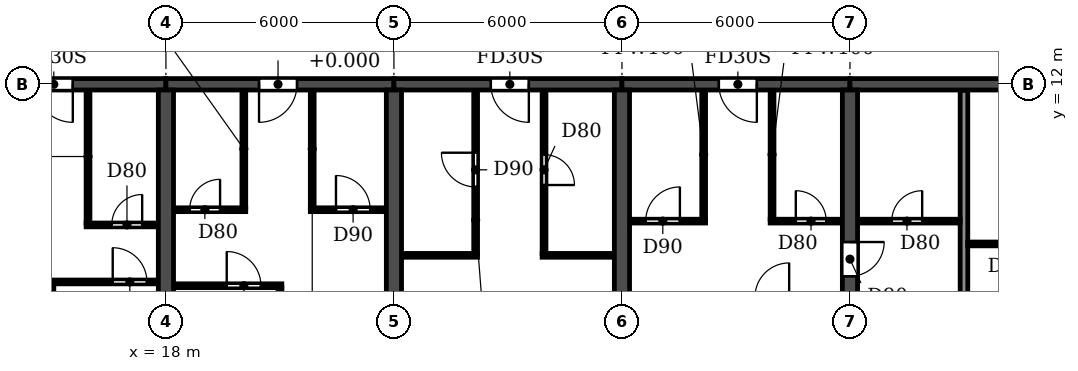
"""IFC4 building model, lengths in metres.
Left out: names, types, materials, properties, quantities, classifications, styles, units other than length and angle.
Written with IfcOpenShell. Run it as: python <this file> out.ifc"""

import sys

from ifc_helpers import new_model, si_unit, direction, frame, frame_2d, origin, place, context, subcontext, project, spatial, rectangle, extrude, element, fill, save


model = new_model("IFC4")
c1 = context("Model", 3, precision=1e-05, world=origin(), true_north=direction((0.0, 1.0)))
c2 = subcontext(c1, "Body", "Model", "MODEL_VIEW")
j1 = project(units=[si_unit("LENGTHUNIT", "METRE"), si_unit("PLANEANGLEUNIT", "RADIAN")], contexts=[c1])
p1 = place(None, origin())
s1 = spatial("IfcSite", under=j1, at=p1, CompositionType="ELEMENT")
p2 = place(p1, origin())
s2 = spatial("IfcBuilding", under=s1, at=p2, CompositionType="ELEMENT")
p3 = place(p2, frame((0.0, 0.0, 33.3)))
s3 = spatial("IfcBuildingStorey", under=s2, at=p3, CompositionType="ELEMENT", Elevation=33.3)
for number, where, z_axis, x_axis in (
    (1, (18.0, 0.2, 0.0), (0.0, 0.0, 1.0), (0.0, 1.0, 0.0)),
    (2, (24.0, 0.2, 0.0), (0.0, 0.0, 1.0), (0.0, 1.0, 0.0)),
    (3, (30.0, 0.2, 0.0), (0.0, 0.0, 1.0), (0.0, 1.0, 0.0)),
):
    element("IfcWall", number, at=place(p3, frame(where, z_axis=z_axis, x_axis=x_axis)), inside=s3, PredefinedType="SHEAR", context=c2, shape_type="SweptSolid", body=[
        extrude(rectangle(XDim=11.65, YDim=0.4, at=frame_2d((5.825, 0.0))), origin(), (0.0, 0.0, 1.0), 3.05),
    ])
p4 = place(p3, frame((36.0, 0.2, 0.0), z_axis=(0.0, 0.0, 1.0), x_axis=(0.0, 1.0, 0.0)))
e4 = element("IfcWall", 4, at=p4, inside=s3, PredefinedType="SHEAR", context=c2, shape_type="SweptSolid", body=[
    extrude(rectangle(XDim=11.65, YDim=0.4, at=frame_2d((5.825, 0.0))), origin(), (0.0, 0.0, 1.0), 3.05),
])
p5 = place(p4, frame((6.75, 0.0, 0.0)))
e5 = element("IfcOpeningElement", 5, at=p5, cuts=e4, PredefinedType="OPENING", context=c2, shape_type="SweptSolid", body=[
    extrude(rectangle(XDim=0.9, YDim=2.1, at=frame_2d((0.45, 1.05))), frame((0.0, 0.21, 0.0), z_axis=(0.0, -1.0, 0.0), x_axis=(1.0, 0.0, 0.0)), (0.0, 0.0, 1.0), 0.42),
])
p6 = place(p3, frame((12.0, 12.0, 0.0), z_axis=(0.0, 0.0, 1.0), x_axis=(1.0, 0.0, 0.0)))
e6 = element("IfcWall", 6, at=p6, inside=s3, PredefinedType="SHEAR", context=c2, shape_type="SweptSolid", body=[
    extrude(rectangle(XDim=6.0, YDim=0.3, at=frame_2d((3.0, 0.0))), origin(), (0.0, 0.0, 1.0), 2.45),
])
p7 = place(p6, frame((2.55, 0.0, 0.0)))
e7 = element("IfcOpeningElement", 7, at=p7, cuts=e6, PredefinedType="OPENING", context=c2, shape_type="SweptSolid", body=[
    extrude(rectangle(XDim=1.0, YDim=2.1, at=frame_2d((0.5, 1.05))), frame((0.0, 0.16, 0.0), z_axis=(0.0, -1.0, 0.0), x_axis=(1.0, 0.0, 0.0)), (0.0, 0.0, 1.0), 0.32),
])
p8 = place(p3, frame((18.0, 12.0, 0.0), z_axis=(0.0, 0.0, 1.0), x_axis=(1.0, 0.0, 0.0)))
e8 = element("IfcWall", 8, at=p8, inside=s3, PredefinedType="SHEAR", context=c2, shape_type="SweptSolid", body=[
    extrude(rectangle(XDim=6.0, YDim=0.3, at=frame_2d((3.0, 0.0))), origin(), (0.0, 0.0, 1.0), 2.45),
])
p9 = place(p8, frame((2.45, 0.0, 0.0)))
e9 = element("IfcOpeningElement", 9, at=p9, cuts=e8, PredefinedType="OPENING", context=c2, shape_type="SweptSolid", body=[
    extrude(rectangle(XDim=1.0, YDim=2.1, at=frame_2d((0.5, 1.05))), frame((0.0, 0.16, 0.0), z_axis=(0.0, -1.0, 0.0), x_axis=(1.0, 0.0, 0.0)), (0.0, 0.0, 1.0), 0.32),
])
p10 = place(p3, frame((24.0, 12.0, 0.0), z_axis=(0.0, 0.0, 1.0), x_axis=(1.0, 0.0, 0.0)))
e10 = element("IfcWall", 10, at=p10, inside=s3, PredefinedType="SHEAR", context=c2, shape_type="SweptSolid", body=[
    extrude(rectangle(XDim=6.0, YDim=0.3, at=frame_2d((3.0, 0.0))), origin(), (0.0, 0.0, 1.0), 2.45),
])
p11 = place(p10, frame((2.55, 0.0, 0.0)))
e11 = element("IfcOpeningElement", 11, at=p11, cuts=e10, PredefinedType="OPENING", context=c2, shape_type="SweptSolid", body=[
    extrude(rectangle(XDim=1.0, YDim=2.1, at=frame_2d((0.5, 1.05))), frame((0.0, 0.16, 0.0), z_axis=(0.0, -1.0, 0.0), x_axis=(1.0, 0.0, 0.0)), (0.0, 0.0, 1.0), 0.32),
])
p12 = place(p3, frame((30.0, 12.0, 0.0), z_axis=(0.0, 0.0, 1.0), x_axis=(1.0, 0.0, 0.0)))
e12 = element("IfcWall", 12, at=p12, inside=s3, PredefinedType="SHEAR", context=c2, shape_type="SweptSolid", body=[
    extrude(rectangle(XDim=6.0, YDim=0.3, at=frame_2d((3.0, 0.0))), origin(), (0.0, 0.0, 1.0), 2.45),
])
p13 = place(p12, frame((2.55, 0.0, 0.0)))
e13 = element("IfcOpeningElement", 13, at=p13, cuts=e12, PredefinedType="OPENING", context=c2, shape_type="SweptSolid", body=[
    extrude(rectangle(XDim=1.0, YDim=2.1, at=frame_2d((0.5, 1.05))), frame((0.0, 0.16, 0.0), z_axis=(0.0, -1.0, 0.0), x_axis=(1.0, 0.0, 0.0)), (0.0, 0.0, 1.0), 0.32),
])
p14 = place(p3, frame((36.0, 12.0, 0.0), z_axis=(0.0, 0.0, 1.0), x_axis=(1.0, 0.0, 0.0)))
e14 = element("IfcWall", 14, at=p14, inside=s3, PredefinedType="SHEAR", context=c2, shape_type="SweptSolid", body=[
    extrude(rectangle(XDim=6.0, YDim=0.3, at=frame_2d((3.0, 0.0))), origin(), (0.0, 0.0, 1.0), 2.45),
])
p15 = place(p3, frame((39.0, 0.06, 0.0), z_axis=(0.0, 0.0, 1.0), x_axis=(0.0, 1.0, 0.0)))
e15 = element("IfcWall", 15, at=p15, inside=s3, PredefinedType="PARTITIONING", context=c2, shape_type="SweptSolid", body=[
    extrude(rectangle(XDim=11.78, YDim=0.2, at=frame_2d((5.89, 0.0))), origin(), (0.0, 0.0, 1.0), 3.05),
])
p16 = place(p3, frame((18.21, 6.7, 0.0), z_axis=(0.0, 0.0, 1.0), x_axis=(1.0, 0.0, 0.0)))
e16 = element("IfcWall", 16, at=p16, inside=s3, PredefinedType="PARTITIONING", context=c2, shape_type="SweptSolid", body=[
    extrude(rectangle(XDim=2.84, YDim=0.1, at=frame_2d((1.42, 0.0))), origin(), (0.0, 0.0, 1.0), 3.05),
])
p17 = place(p16, frame((1.39, 0.0, 0.0)))
e17 = element("IfcOpeningElement", 17, at=p17, cuts=e16, PredefinedType="OPENING", context=c2, shape_type="SweptSolid", body=[
    extrude(rectangle(XDim=0.9, YDim=2.1, at=frame_2d((0.45, 1.05))), frame((0.0, 0.06, 0.0), z_axis=(0.0, -1.0, 0.0), x_axis=(1.0, 0.0, 0.0)), (0.0, 0.0, 1.0), 0.12),
])
p18 = place(p3, frame((14.95, 6.8, 0.0), z_axis=(0.0, 0.0, 1.0), x_axis=(1.0, 0.0, 0.0)))
e18 = element("IfcWall", 18, at=p18, inside=s3, PredefinedType="PARTITIONING", context=c2, shape_type="SweptSolid", body=[
    extrude(rectangle(XDim=2.84, YDim=0.1, at=frame_2d((1.42, 0.0))), origin(), (0.0, 0.0, 1.0), 3.05),
])
p19 = place(p18, frame((1.65, 0.0, 0.0)))
e19 = element("IfcOpeningElement", 19, at=p19, cuts=e18, PredefinedType="OPENING", context=c2, shape_type="SweptSolid", body=[
    extrude(rectangle(XDim=0.9, YDim=2.1, at=frame_2d((0.45, 1.05))), frame((0.0, 0.06, 0.0), z_axis=(0.0, -1.0, 0.0), x_axis=(1.0, 0.0, 0.0)), (0.0, 0.0, 1.0), 0.12),
])
p20 = place(p3, frame((24.21, 7.5, 0.0), z_axis=(0.0, 0.0, 1.0), x_axis=(1.0, 0.0, 0.0)))
e20 = element("IfcWall", 20, at=p20, inside=s3, PredefinedType="PARTITIONING", context=c2, shape_type="SweptSolid", body=[
    extrude(rectangle(XDim=1.99, YDim=0.1, at=frame_2d((0.995, 0.0))), origin(), (0.0, 0.0, 1.0), 3.05),
])
p21 = place(p3, frame((27.9, 7.5, 0.0), z_axis=(0.0, 0.0, 1.0), x_axis=(1.0, 0.0, 0.0)))
e21 = element("IfcWall", 21, at=p21, inside=s3, PredefinedType="PARTITIONING", context=c2, shape_type="SweptSolid", body=[
    extrude(rectangle(XDim=1.89, YDim=0.1, at=frame_2d((0.945, 0.0))), origin(), (0.0, 0.0, 1.0), 3.05),
])
p22 = place(p3, frame((39.1, 7.8, 0.0), z_axis=(0.0, 0.0, 1.0), x_axis=(1.0, 0.0, 0.0)))
e22 = element("IfcWall", 22, at=p22, inside=s3, PredefinedType="PARTITIONING", context=c2, shape_type="SweptSolid", body=[
    extrude(rectangle(XDim=2.69, YDim=0.1, at=frame_2d((1.345, 0.0))), origin(), (0.0, 0.0, 1.0), 3.05),
])
p23 = place(p22, frame((1.0, 0.0, 0.0)))
e23 = element("IfcOpeningElement", 23, at=p23, cuts=e22, PredefinedType="OPENING", context=c2, shape_type="SweptSolid", body=[
    extrude(rectangle(XDim=0.8, YDim=2.1, at=frame_2d((0.4, 1.05))), frame((0.0, 0.06, 0.0), z_axis=(0.0, -1.0, 0.0), x_axis=(1.0, 0.0, 0.0)), (0.0, 0.0, 1.0), 0.12),
])
p24 = place(p3, frame((15.9, 8.3, 0.0), z_axis=(0.0, 0.0, 1.0), x_axis=(1.0, 0.0, 0.0)))
e24 = element("IfcWall", 24, at=p24, inside=s3, PredefinedType="PARTITIONING", context=c2, shape_type="SweptSolid", body=[
    extrude(rectangle(XDim=1.89, YDim=0.1, at=frame_2d((0.945, 0.0))), origin(), (0.0, 0.0, 1.0), 3.05),
])
p25 = place(p24, frame((0.675, 0.0, 0.0)))
e25 = element("IfcOpeningElement", 25, at=p25, cuts=e24, PredefinedType="OPENING", context=c2, shape_type="SweptSolid", body=[
    extrude(rectangle(XDim=0.8, YDim=2.1, at=frame_2d((0.4, 1.05))), frame((0.0, 0.06, 0.0), z_axis=(0.0, -1.0, 0.0), x_axis=(1.0, 0.0, 0.0)), (0.0, 0.0, 1.0), 0.12),
])
p26 = place(p3, frame((30.21, 8.4, 0.0), z_axis=(0.0, 0.0, 1.0), x_axis=(1.0, 0.0, 0.0)))
e26 = element("IfcWall", 26, at=p26, inside=s3, PredefinedType="PARTITIONING", context=c2, shape_type="SweptSolid", body=[
    extrude(rectangle(XDim=1.99, YDim=0.1, at=frame_2d((0.995, 0.0))), origin(), (0.0, 0.0, 1.0), 3.05),
])
p27 = place(p26, frame((0.415, 0.0, 0.0)))
e27 = element("IfcOpeningElement", 27, at=p27, cuts=e26, PredefinedType="OPENING", context=c2, shape_type="SweptSolid", body=[
    extrude(rectangle(XDim=0.9, YDim=2.1, at=frame_2d((0.45, 1.05))), frame((0.0, 0.06, 0.0), z_axis=(0.0, -1.0, 0.0), x_axis=(1.0, 0.0, 0.0)), (0.0, 0.0, 1.0), 0.12),
])
p28 = place(p3, frame((33.9, 8.4, 0.0), z_axis=(0.0, 0.0, 1.0), x_axis=(1.0, 0.0, 0.0)))
e28 = element("IfcWall", 28, at=p28, inside=s3, PredefinedType="PARTITIONING", context=c2, shape_type="SweptSolid", body=[
    extrude(rectangle(XDim=1.89, YDim=0.1, at=frame_2d((0.945, 0.0))), origin(), (0.0, 0.0, 1.0), 3.05),
])
p29 = place(p28, frame((0.675, 0.0, 0.0)))
e29 = element("IfcOpeningElement", 29, at=p29, cuts=e28, PredefinedType="OPENING", context=c2, shape_type="SweptSolid", body=[
    extrude(rectangle(XDim=0.8, YDim=2.1, at=frame_2d((0.4, 1.05))), frame((0.0, 0.06, 0.0), z_axis=(0.0, -1.0, 0.0), x_axis=(1.0, 0.0, 0.0)), (0.0, 0.0, 1.0), 0.12),
])
p30 = place(p3, frame((36.21, 8.4, 0.0), z_axis=(0.0, 0.0, 1.0), x_axis=(1.0, 0.0, 0.0)))
e30 = element("IfcWall", 30, at=p30, inside=s3, PredefinedType="PARTITIONING", context=c2, shape_type="SweptSolid", body=[
    extrude(rectangle(XDim=2.69, YDim=0.1, at=frame_2d((1.345, 0.0))), origin(), (0.0, 0.0, 1.0), 3.05),
])
p31 = place(p30, frame((0.89, 0.0, 0.0)))
e31 = element("IfcOpeningElement", 31, at=p31, cuts=e30, PredefinedType="OPENING", context=c2, shape_type="SweptSolid", body=[
    extrude(rectangle(XDim=0.8, YDim=2.1, at=frame_2d((0.4, 1.05))), frame((0.0, 0.06, 0.0), z_axis=(0.0, -1.0, 0.0), x_axis=(1.0, 0.0, 0.0)), (0.0, 0.0, 1.0), 0.12),
])
p32 = place(p3, frame((18.21, 8.7, 0.0), z_axis=(0.0, 0.0, 1.0), x_axis=(1.0, 0.0, 0.0)))
e32 = element("IfcWall", 32, at=p32, inside=s3, PredefinedType="PARTITIONING", context=c2, shape_type="SweptSolid", body=[
    extrude(rectangle(XDim=1.89, YDim=0.1, at=frame_2d((0.945, 0.0))), origin(), (0.0, 0.0, 1.0), 3.05),
])
p33 = place(p32, frame((0.415, 0.0, 0.0)))
e33 = element("IfcOpeningElement", 33, at=p33, cuts=e32, PredefinedType="OPENING", context=c2, shape_type="SweptSolid", body=[
    extrude(rectangle(XDim=0.8, YDim=2.1, at=frame_2d((0.4, 1.05))), frame((0.0, 0.06, 0.0), z_axis=(0.0, -1.0, 0.0), x_axis=(1.0, 0.0, 0.0)), (0.0, 0.0, 1.0), 0.12),
])
p34 = place(p3, frame((21.8, 8.7, 0.0), z_axis=(0.0, 0.0, 1.0), x_axis=(1.0, 0.0, 0.0)))
e34 = element("IfcWall", 34, at=p34, inside=s3, PredefinedType="PARTITIONING", context=c2, shape_type="SweptSolid", body=[
    extrude(rectangle(XDim=1.99, YDim=0.1, at=frame_2d((0.995, 0.0))), origin(), (0.0, 0.0, 1.0), 3.05),
])
p35 = place(p34, frame((0.675, 0.0, 0.0)))
e35 = element("IfcOpeningElement", 35, at=p35, cuts=e34, PredefinedType="OPENING", context=c2, shape_type="SweptSolid", body=[
    extrude(rectangle(XDim=0.9, YDim=2.1, at=frame_2d((0.45, 1.05))), frame((0.0, 0.06, 0.0), z_axis=(0.0, -1.0, 0.0), x_axis=(1.0, 0.0, 0.0)), (0.0, 0.0, 1.0), 0.12),
])
p36 = place(p3, frame((15.0, 0.06, 0.0), z_axis=(0.0, 0.0, 1.0), x_axis=(0.0, 1.0, 0.0)))
e36 = element("IfcWall", 36, at=p36, inside=s3, PredefinedType="PARTITIONING", context=c2, shape_type="SweptSolid", body=[
    extrude(rectangle(XDim=6.69, YDim=0.1, at=frame_2d((3.345, 0.0))), origin(), (0.0, 0.0, 1.0), 3.05),
])
p37 = place(p3, frame((15.95, 8.35, 0.0), z_axis=(0.0, 0.0, 1.0), x_axis=(0.0, 1.0, 0.0)))
e37 = element("IfcWall", 37, at=p37, inside=s3, PredefinedType="PARTITIONING", context=c2, shape_type="SweptSolid", body=[
    extrude(rectangle(XDim=3.49, YDim=0.1, at=frame_2d((1.745, 0.0))), origin(), (0.0, 0.0, 1.0), 3.05),
])
p38 = place(p3, frame((20.05, 8.75, 0.0), z_axis=(0.0, 0.0, 1.0), x_axis=(0.0, 1.0, 0.0)))
e38 = element("IfcWall", 38, at=p38, inside=s3, PredefinedType="PARTITIONING", context=c2, shape_type="SweptSolid", body=[
    extrude(rectangle(XDim=3.09, YDim=0.1, at=frame_2d((1.545, 0.0))), origin(), (0.0, 0.0, 1.0), 3.05),
])
p39 = place(p3, frame((21.0, 0.06, 0.0), z_axis=(0.0, 0.0, 1.0), x_axis=(0.0, 1.0, 0.0)))
e39 = element("IfcWall", 39, at=p39, inside=s3, PredefinedType="PARTITIONING", context=c2, shape_type="SweptSolid", body=[
    extrude(rectangle(XDim=6.59, YDim=0.1, at=frame_2d((3.295, 0.0))), origin(), (0.0, 0.0, 1.0), 3.05),
])
p40 = place(p3, frame((21.85, 8.75, 0.0), z_axis=(0.0, 0.0, 1.0), x_axis=(0.0, 1.0, 0.0)))
e40 = element("IfcWall", 40, at=p40, inside=s3, PredefinedType="PARTITIONING", context=c2, shape_type="SweptSolid", body=[
    extrude(rectangle(XDim=3.09, YDim=0.1, at=frame_2d((1.545, 0.0))), origin(), (0.0, 0.0, 1.0), 3.05),
])
p41 = place(p3, frame((26.15, 7.55, 0.0), z_axis=(0.0, 0.0, 1.0), x_axis=(0.0, 1.0, 0.0)))
e41 = element("IfcWall", 41, at=p41, inside=s3, PredefinedType="PARTITIONING", context=c2, shape_type="SweptSolid", body=[
    extrude(rectangle(XDim=4.29, YDim=0.1, at=frame_2d((2.145, 0.0))), origin(), (0.0, 0.0, 1.0), 3.05),
])
p42 = place(p41, frame((1.75, 0.0, 0.0)))
e42 = element("IfcOpeningElement", 42, at=p42, cuts=e41, PredefinedType="OPENING", context=c2, shape_type="SweptSolid", body=[
    extrude(rectangle(XDim=0.9, YDim=2.1, at=frame_2d((0.45, 1.05))), frame((0.0, 0.06, 0.0), z_axis=(0.0, -1.0, 0.0), x_axis=(1.0, 0.0, 0.0)), (0.0, 0.0, 1.0), 0.12),
])
p43 = place(p3, frame((27.95, 7.55, 0.0), z_axis=(0.0, 0.0, 1.0), x_axis=(0.0, 1.0, 0.0)))
e43 = element("IfcWall", 43, at=p43, inside=s3, PredefinedType="PARTITIONING", context=c2, shape_type="SweptSolid", body=[
    extrude(rectangle(XDim=4.29, YDim=0.1, at=frame_2d((2.145, 0.0))), origin(), (0.0, 0.0, 1.0), 3.05),
])
p44 = place(p43, frame((1.8, 0.0, 0.0)))
e44 = element("IfcOpeningElement", 44, at=p44, cuts=e43, PredefinedType="OPENING", context=c2, shape_type="SweptSolid", body=[
    extrude(rectangle(XDim=0.8, YDim=2.1, at=frame_2d((0.4, 1.05))), frame((0.0, 0.06, 0.0), z_axis=(0.0, -1.0, 0.0), x_axis=(1.0, 0.0, 0.0)), (0.0, 0.0, 1.0), 0.12),
])
for number, where, z_axis, x_axis in (
    (45, (32.15, 8.45, 0.0), (0.0, 0.0, 1.0), (0.0, 1.0, 0.0)),
    (46, (33.95, 8.45, 0.0), (0.0, 0.0, 1.0), (0.0, 1.0, 0.0)),
):
    element("IfcWall", number, at=place(p3, frame(where, z_axis=z_axis, x_axis=x_axis)), inside=s3, PredefinedType="PARTITIONING", context=c2, shape_type="SweptSolid", body=[
        extrude(rectangle(XDim=3.39, YDim=0.1, at=frame_2d((1.695, 0.0))), origin(), (0.0, 0.0, 1.0), 3.05),
    ])
p45 = place(p7, frame((1.0, 0.0, 0.0), z_axis=(0.0, 0.0, 1.0), x_axis=(-1.0, 0.0, 0.0)))
e47 = element("IfcDoor", 47, at=p45, inside=s3, OperationType="SINGLE_SWING_LEFT", PredefinedType="DOOR", context=c2, shape_type="SweptSolid", body=[
    extrude(rectangle(XDim=1.0, YDim=2.1, at=frame_2d((0.5, 1.05))), frame((0.0, 0.025, 0.0), z_axis=(0.0, -1.0, 0.0), x_axis=(1.0, 0.0, 0.0)), (0.0, 0.0, 1.0), 0.05),
])
fill(e7, e47)
p46 = place(p25, origin())
e48 = element("IfcDoor", 48, at=p46, inside=s3, OperationType="SINGLE_SWING_RIGHT", PredefinedType="DOOR", context=c2, shape_type="SweptSolid", body=[
    extrude(rectangle(XDim=0.8, YDim=2.1, at=frame_2d((0.4, 1.05))), frame((0.0, 0.025, 0.0), z_axis=(0.0, -1.0, 0.0), x_axis=(1.0, 0.0, 0.0)), (0.0, 0.0, 1.0), 0.05),
])
fill(e25, e48)
p47 = place(p19, origin())
e49 = element("IfcDoor", 49, at=p47, inside=s3, OperationType="SINGLE_SWING_LEFT", PredefinedType="DOOR", context=c2, shape_type="SweptSolid", body=[
    extrude(rectangle(XDim=0.9, YDim=2.1, at=frame_2d((0.45, 1.05))), frame((0.0, 0.025, 0.0), z_axis=(0.0, -1.0, 0.0), x_axis=(1.0, 0.0, 0.0)), (0.0, 0.0, 1.0), 0.05),
])
fill(e19, e49)
p48 = place(p33, origin())
e50 = element("IfcDoor", 50, at=p48, inside=s3, OperationType="SINGLE_SWING_RIGHT", PredefinedType="DOOR", context=c2, shape_type="SweptSolid", body=[
    extrude(rectangle(XDim=0.8, YDim=2.1, at=frame_2d((0.4, 1.05))), frame((0.0, 0.025, 0.0), z_axis=(0.0, -1.0, 0.0), x_axis=(1.0, 0.0, 0.0)), (0.0, 0.0, 1.0), 0.05),
])
fill(e33, e50)
p49 = place(p17, origin())
e51 = element("IfcDoor", 51, at=p49, inside=s3, OperationType="SINGLE_SWING_LEFT", PredefinedType="DOOR", context=c2, shape_type="SweptSolid", body=[
    extrude(rectangle(XDim=0.9, YDim=2.1, at=frame_2d((0.45, 1.05))), frame((0.0, 0.025, 0.0), z_axis=(0.0, -1.0, 0.0), x_axis=(1.0, 0.0, 0.0)), (0.0, 0.0, 1.0), 0.05),
])
fill(e17, e51)
p50 = place(p9, frame((1.0, 0.0, 0.0), z_axis=(0.0, 0.0, 1.0), x_axis=(-1.0, 0.0, 0.0)))
e52 = element("IfcDoor", 52, at=p50, inside=s3, OperationType="SINGLE_SWING_RIGHT", PredefinedType="DOOR", context=c2, shape_type="SweptSolid", body=[
    extrude(rectangle(XDim=1.0, YDim=2.1, at=frame_2d((0.5, 1.05))), frame((0.0, 0.025, 0.0), z_axis=(0.0, -1.0, 0.0), x_axis=(1.0, 0.0, 0.0)), (0.0, 0.0, 1.0), 0.05),
])
fill(e9, e52)
p51 = place(p35, origin())
e53 = element("IfcDoor", 53, at=p51, inside=s3, OperationType="SINGLE_SWING_LEFT", PredefinedType="DOOR", context=c2, shape_type="SweptSolid", body=[
    extrude(rectangle(XDim=0.9, YDim=2.1, at=frame_2d((0.45, 1.05))), frame((0.0, 0.025, 0.0), z_axis=(0.0, -1.0, 0.0), x_axis=(1.0, 0.0, 0.0)), (0.0, 0.0, 1.0), 0.05),
])
fill(e35, e53)
p52 = place(p42, origin())
e54 = element("IfcDoor", 54, at=p52, inside=s3, OperationType="SINGLE_SWING_RIGHT", PredefinedType="DOOR", context=c2, shape_type="SweptSolid", body=[
    extrude(rectangle(XDim=0.9, YDim=2.1, at=frame_2d((0.45, 1.05))), frame((0.0, 0.025, 0.0), z_axis=(0.0, -1.0, 0.0), x_axis=(1.0, 0.0, 0.0)), (0.0, 0.0, 1.0), 0.05),
])
fill(e42, e54)
p53 = place(p11, frame((1.0, 0.0, 0.0), z_axis=(0.0, 0.0, 1.0), x_axis=(-1.0, 0.0, 0.0)))
e55 = element("IfcDoor", 55, at=p53, inside=s3, OperationType="SINGLE_SWING_LEFT", PredefinedType="DOOR", context=c2, shape_type="SweptSolid", body=[
    extrude(rectangle(XDim=1.0, YDim=2.1, at=frame_2d((0.5, 1.05))), frame((0.0, 0.025, 0.0), z_axis=(0.0, -1.0, 0.0), x_axis=(1.0, 0.0, 0.0)), (0.0, 0.0, 1.0), 0.05),
])
fill(e11, e55)
p54 = place(p44, frame((0.8, 0.0, 0.0), z_axis=(0.0, 0.0, 1.0), x_axis=(-1.0, 0.0, 0.0)))
e56 = element("IfcDoor", 56, at=p54, inside=s3, OperationType="SINGLE_SWING_RIGHT", PredefinedType="DOOR", context=c2, shape_type="SweptSolid", body=[
    extrude(rectangle(XDim=0.8, YDim=2.1, at=frame_2d((0.4, 1.05))), frame((0.0, 0.025, 0.0), z_axis=(0.0, -1.0, 0.0), x_axis=(1.0, 0.0, 0.0)), (0.0, 0.0, 1.0), 0.05),
])
fill(e44, e56)
p55 = place(p31, origin())
e57 = element("IfcDoor", 57, at=p55, inside=s3, OperationType="SINGLE_SWING_RIGHT", PredefinedType="DOOR", context=c2, shape_type="SweptSolid", body=[
    extrude(rectangle(XDim=0.8, YDim=2.1, at=frame_2d((0.4, 1.05))), frame((0.0, 0.025, 0.0), z_axis=(0.0, -1.0, 0.0), x_axis=(1.0, 0.0, 0.0)), (0.0, 0.0, 1.0), 0.05),
])
fill(e31, e57)
p56 = place(p27, origin())
e58 = element("IfcDoor", 58, at=p56, inside=s3, OperationType="SINGLE_SWING_RIGHT", PredefinedType="DOOR", context=c2, shape_type="SweptSolid", body=[
    extrude(rectangle(XDim=0.9, YDim=2.1, at=frame_2d((0.45, 1.05))), frame((0.0, 0.025, 0.0), z_axis=(0.0, -1.0, 0.0), x_axis=(1.0, 0.0, 0.0)), (0.0, 0.0, 1.0), 0.05),
])
fill(e27, e58)
p57 = place(p13, frame((1.0, 0.0, 0.0), z_axis=(0.0, 0.0, 1.0), x_axis=(-1.0, 0.0, 0.0)))
e59 = element("IfcDoor", 59, at=p57, inside=s3, OperationType="SINGLE_SWING_LEFT", PredefinedType="DOOR", context=c2, shape_type="SweptSolid", body=[
    extrude(rectangle(XDim=1.0, YDim=2.1, at=frame_2d((0.5, 1.05))), frame((0.0, 0.025, 0.0), z_axis=(0.0, -1.0, 0.0), x_axis=(1.0, 0.0, 0.0)), (0.0, 0.0, 1.0), 0.05),
])
fill(e13, e59)
p58 = place(p29, origin())
e60 = element("IfcDoor", 60, at=p58, inside=s3, OperationType="SINGLE_SWING_LEFT", PredefinedType="DOOR", context=c2, shape_type="SweptSolid", body=[
    extrude(rectangle(XDim=0.8, YDim=2.1, at=frame_2d((0.4, 1.05))), frame((0.0, 0.025, 0.0), z_axis=(0.0, -1.0, 0.0), x_axis=(1.0, 0.0, 0.0)), (0.0, 0.0, 1.0), 0.05),
])
fill(e29, e60)
p59 = place(p5, frame((0.9, 0.0, 0.0), z_axis=(0.0, 0.0, 1.0), x_axis=(-1.0, 0.0, 0.0)))
e61 = element("IfcDoor", 61, at=p59, inside=s3, OperationType="SINGLE_SWING_LEFT", PredefinedType="DOOR", context=c2, shape_type="SweptSolid", body=[
    extrude(rectangle(XDim=0.9, YDim=2.1, at=frame_2d((0.45, 1.05))), frame((0.0, 0.025, 0.0), z_axis=(0.0, -1.0, 0.0), x_axis=(1.0, 0.0, 0.0)), (0.0, 0.0, 1.0), 0.05),
])
fill(e5, e61)
save(model, sys.argv[1])
